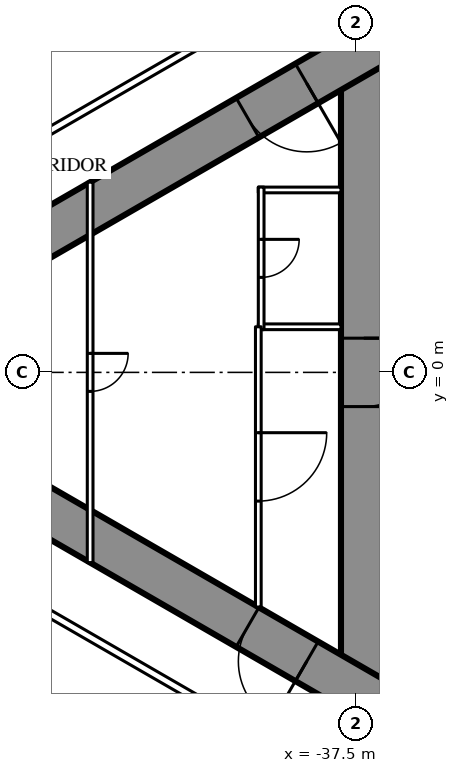
"""IFC4 building model, lengths in metres.
Left out: names, types, materials, properties, quantities, classifications, styles, units other than length and angle.
Written with IfcOpenShell. Run it as: python <this file> out.ifc"""

import sys

from ifc_helpers import new_model, si_unit, direction, frame, frame_2d, origin, place, context, subcontext, project, spatial, rectangle, extrude, element, fill, save


model = new_model("IFC4")
c1 = context("Model", 3, precision=1e-05, world=origin(), true_north=direction((0.0, 1.0)))
c2 = subcontext(c1, "Body", "Model", "MODEL_VIEW")
j1 = project(units=[si_unit("LENGTHUNIT", "METRE"), si_unit("PLANEANGLEUNIT", "RADIAN")], contexts=[c1])
p1 = place(None, origin())
s1 = spatial("IfcSite", under=j1, at=p1, CompositionType="ELEMENT")
p2 = place(p1, origin())
s2 = spatial("IfcBuilding", under=s1, at=p2, CompositionType="ELEMENT")
p3 = place(p2, frame((0.0, 0.0, 42.5)))
s3 = spatial("IfcBuildingStorey", under=s2, at=p3, CompositionType="ELEMENT", Elevation=42.5)
p4 = place(p3, frame((-37.3, 8.6, 0.0), z_axis=(0.0, 0.0, 1.0), x_axis=(0.0, -1.0, 0.0)))
e1 = element("IfcWall", 1, at=p4, inside=s3, PredefinedType="SHEAR", context=c2, shape_type="SweptSolid", body=[
    extrude(rectangle(XDim=17.2, YDim=1.2, at=frame_2d((8.6, 0.0))), origin(), (0.0, 0.0, 1.0), 3.5),
])
p5 = place(p4, frame((7.7, 0.0, 0.0)))
e2 = element("IfcOpeningElement", 2, at=p5, cuts=e1, PredefinedType="OPENING", context=c2, shape_type="SweptSolid", body=[
    extrude(rectangle(XDim=1.8, YDim=2.2, at=frame_2d((0.9, 1.1))), frame((0.0, 0.61, 0.0), z_axis=(0.0, -1.0, 0.0), x_axis=(1.0, 0.0, 0.0)), (0.0, 0.0, 1.0), 1.22),
])
p6 = place(p3, frame((-27.2, 14.3, 0.0), z_axis=(0.0, 0.0, 1.0), x_axis=(-0.866026593062, -0.499997940104, 0.0)))
e3 = element("IfcWall", 3, at=p6, inside=s3, PredefinedType="SHEAR", context=c2, shape_type="SweptSolid", body=[
    extrude(rectangle(XDim=28.946, YDim=1.2, at=frame_2d((14.473, 0.0))), origin(), (0.0, 0.0, 1.0), 3.5),
])
p7 = place(p6, frame((4.6, 0.0, 0.0)))
e4 = element("IfcOpeningElement", 4, at=p7, cuts=e3, PredefinedType="OPENING", context=c2, shape_type="SweptSolid", body=[
    extrude(rectangle(XDim=1.0, YDim=2.2, at=frame_2d((0.5, 1.1))), frame((0.0, 0.61, 0.0), z_axis=(0.0, -1.0, 0.0), x_axis=(1.0, 0.0, 0.0)), (0.0, 0.0, 1.0), 1.22),
])
p8 = place(p6, frame((13.395, 0.0, 0.0)))
e5 = element("IfcOpeningElement", 5, at=p8, cuts=e3, PredefinedType="OPENING", context=c2, shape_type="SweptSolid", body=[
    extrude(rectangle(XDim=1.8, YDim=2.2, at=frame_2d((0.9, 1.1))), frame((0.0, 0.61, 0.0), z_axis=(0.0, -1.0, 0.0), x_axis=(1.0, 0.0, 0.0)), (0.0, 0.0, 1.0), 1.22),
])
p9 = place(p3, frame((-27.2, -14.3, 0.0), z_axis=(0.0, 0.0, 1.0), x_axis=(-0.866024021859, 0.500002393557, 0.0)))
e6 = element("IfcWall", 6, at=p9, inside=s3, PredefinedType="SHEAR", context=c2, shape_type="SweptSolid", body=[
    extrude(rectangle(XDim=27.907, YDim=1.2, at=frame_2d((13.954, 0.0))), origin(), (0.0, 0.0, 1.0), 3.5),
])
p10 = place(p9, frame((4.6, 0.0, 0.0)))
e7 = element("IfcOpeningElement", 7, at=p10, cuts=e6, PredefinedType="OPENING", context=c2, shape_type="SweptSolid", body=[
    extrude(rectangle(XDim=1.0, YDim=2.2, at=frame_2d((0.5, 1.1))), frame((0.0, 0.61, 0.0), z_axis=(0.0, -1.0, 0.0), x_axis=(1.0, 0.0, 0.0)), (0.0, 0.0, 1.0), 1.22),
])
p11 = place(p9, frame((13.395, 0.0, 0.0)))
e8 = element("IfcOpeningElement", 8, at=p11, cuts=e6, PredefinedType="OPENING", context=c2, shape_type="SweptSolid", body=[
    extrude(rectangle(XDim=1.8, YDim=2.2, at=frame_2d((0.9, 1.1))), frame((0.0, 0.61, 0.0), z_axis=(0.0, -1.0, 0.0), x_axis=(1.0, 0.0, 0.0)), (0.0, 0.0, 1.0), 1.22),
])
p12 = place(p3, frame((-37.7, 10.894, 0.0), z_axis=(0.0, 0.0, 1.0), x_axis=(-0.866027905338, -0.499995667157, 0.0)))
e9 = element("IfcWall", 9, at=p12, inside=s3, PredefinedType="PARTITIONING", context=c2, shape_type="SweptSolid", body=[
    extrude(rectangle(XDim=21.787, YDim=0.2, at=frame_2d((10.894, 0.0))), origin(), (0.0, 0.0, 1.0), 3.25),
])
p13 = place(p12, frame((11.78, 0.0, 0.0)))
e10 = element("IfcOpeningElement", 10, at=p13, cuts=e9, PredefinedType="OPENING", context=c2, shape_type="SweptSolid", body=[
    extrude(rectangle(XDim=0.95, YDim=2.2, at=frame_2d((0.475, 1.1))), frame((0.0, 0.11, 0.0), z_axis=(0.0, -1.0, 0.0), x_axis=(1.0, 0.0, 0.0)), (0.0, 0.0, 1.0), 0.22),
])
p14 = place(p12, frame((2.95, 0.0, 0.0)))
e11 = element("IfcOpeningElement", 11, at=p14, cuts=e9, PredefinedType="OPENING", context=c2, shape_type="SweptSolid", body=[
    extrude(rectangle(XDim=0.95, YDim=2.2, at=frame_2d((0.475, 1.1))), frame((0.0, 0.11, 0.0), z_axis=(0.0, -1.0, 0.0), x_axis=(1.0, 0.0, 0.0)), (0.0, 0.0, 1.0), 0.22),
])
p15 = place(p3, frame((-36.92, -11.344, 0.0), z_axis=(0.0, 0.0, 1.0), x_axis=(-0.866028313256, 0.499994960614, 0.0)))
e12 = element("IfcWall", 12, at=p15, inside=s3, PredefinedType="PARTITIONING", context=c2, shape_type="SweptSolid", body=[
    extrude(rectangle(XDim=22.568, YDim=0.2, at=frame_2d((11.284, 0.0))), origin(), (0.0, 0.0, 1.0), 3.25),
])
p16 = place(p15, frame((21.018, 0.0, 0.0)))
e13 = element("IfcOpeningElement", 13, at=p16, cuts=e12, PredefinedType="OPENING", context=c2, shape_type="SweptSolid", body=[
    extrude(rectangle(XDim=0.95, YDim=2.2, at=frame_2d((0.475, 1.1))), frame((0.0, 0.11, 0.0), z_axis=(0.0, -1.0, 0.0), x_axis=(1.0, 0.0, 0.0)), (0.0, 0.0, 1.0), 0.22),
])
p17 = place(p15, frame((3.35, 0.0, 0.0)))
e14 = element("IfcOpeningElement", 14, at=p17, cuts=e12, PredefinedType="OPENING", context=c2, shape_type="SweptSolid", body=[
    extrude(rectangle(XDim=1.0, YDim=2.2, at=frame_2d((0.5, 1.1))), frame((0.0, 0.11, 0.0), z_axis=(0.0, -1.0, 0.0), x_axis=(1.0, 0.0, 0.0)), (0.0, 0.0, 1.0), 0.22),
])
for number, where, z_axis, x_axis in (
    (15, (-37.9, 1.2, 0.0), (0.0, 0.0, 1.0), (-1.0, 0.0, 0.0)),
    (16, (-37.9, 4.8, 0.0), (0.0, 0.0, 1.0), (-1.0, 0.0, 0.0)),
):
    element("IfcWall", number, at=place(p3, frame(where, z_axis=z_axis, x_axis=x_axis)), inside=s3, PredefinedType="PARTITIONING", context=c2, shape_type="SweptSolid", body=[
        extrude(rectangle(XDim=2.175, YDim=0.15, at=frame_2d((1.087, 0.0))), origin(), (0.0, 0.0, 1.0), 3.25),
    ])
p18 = place(p3, frame((-40.0, 4.875, 0.0), z_axis=(0.0, 0.0, 1.0), x_axis=(0.0, -1.0, 0.0)))
e17 = element("IfcWall", 17, at=p18, inside=s3, PredefinedType="PARTITIONING", context=c2, shape_type="SweptSolid", body=[
    extrude(rectangle(XDim=3.75, YDim=0.15, at=frame_2d((1.875, 0.0))), origin(), (0.0, 0.0, 1.0), 3.25),
])
p19 = place(p18, frame((1.375, 0.0, 0.0)))
e18 = element("IfcOpeningElement", 18, at=p19, cuts=e17, PredefinedType="OPENING", context=c2, shape_type="SweptSolid", body=[
    extrude(rectangle(XDim=1.0, YDim=2.2, at=frame_2d((0.5, 1.1))), frame((0.0, 0.085, 0.0), z_axis=(0.0, -1.0, 0.0), x_axis=(1.0, 0.0, 0.0)), (0.0, 0.0, 1.0), 0.17),
])
p20 = place(p3, frame((-40.075, 1.2, 0.0), z_axis=(0.0, 0.0, 1.0), x_axis=(0.0, -1.0, 0.0)))
e19 = element("IfcWall", 19, at=p20, inside=s3, PredefinedType="PARTITIONING", context=c2, shape_type="SweptSolid", body=[
    extrude(rectangle(XDim=7.374, YDim=0.15, at=frame_2d((3.687, 0.0))), origin(), (0.0, 0.0, 1.0), 3.25),
])
p21 = place(p20, frame((2.787, 0.0, 0.0)))
e20 = element("IfcOpeningElement", 20, at=p21, cuts=e19, PredefinedType="OPENING", context=c2, shape_type="SweptSolid", body=[
    extrude(rectangle(XDim=1.8, YDim=2.2, at=frame_2d((0.9, 1.1))), frame((0.0, 0.085, 0.0), z_axis=(0.0, -1.0, 0.0), x_axis=(1.0, 0.0, 0.0)), (0.0, 0.0, 1.0), 0.17),
])
p22 = place(p3, frame((-44.5, 5.005, 0.0), z_axis=(0.0, 0.0, 1.0), x_axis=(0.0, -1.0, 0.0)))
e21 = element("IfcWall", 21, at=p22, inside=s3, PredefinedType="PARTITIONING", context=c2, shape_type="SweptSolid", body=[
    extrude(rectangle(XDim=10.009, YDim=0.15, at=frame_2d((5.005, 0.0))), origin(), (0.0, 0.0, 1.0), 2.45),
])
p23 = place(p22, frame((4.505, 0.0, 0.0)))
e22 = element("IfcOpeningElement", 22, at=p23, cuts=e21, PredefinedType="OPENING", context=c2, shape_type="SweptSolid", body=[
    extrude(rectangle(XDim=1.0, YDim=2.2, at=frame_2d((0.5, 1.1))), frame((0.0, 0.085, 0.0), z_axis=(0.0, -1.0, 0.0), x_axis=(1.0, 0.0, 0.0)), (0.0, 0.0, 1.0), 0.17),
])
p24 = place(p19, origin())
e23 = element("IfcDoor", 23, at=p24, inside=s3, OperationType="SINGLE_SWING_LEFT", PredefinedType="DOOR", context=c2, shape_type="SweptSolid", body=[
    extrude(rectangle(XDim=1.0, YDim=2.2, at=frame_2d((0.5, 1.1))), frame((0.0, 0.025, 0.0), z_axis=(0.0, -1.0, 0.0), x_axis=(1.0, 0.0, 0.0)), (0.0, 0.0, 1.0), 0.05),
])
fill(e18, e23)
p25 = place(p21, origin())
e24 = element("IfcDoor", 24, at=p25, inside=s3, OperationType="DOUBLE_DOOR_SINGLE_SWING", PredefinedType="DOOR", context=c2, shape_type="SweptSolid", body=[
    extrude(rectangle(XDim=1.8, YDim=2.2, at=frame_2d((0.9, 1.1))), frame((0.0, 0.025, 0.0), z_axis=(0.0, -1.0, 0.0), x_axis=(1.0, 0.0, 0.0)), (0.0, 0.0, 1.0), 0.05),
])
fill(e20, e24)
p26 = place(p23, origin())
e25 = element("IfcDoor", 25, at=p26, inside=s3, OperationType="SINGLE_SWING_LEFT", PredefinedType="DOOR", context=c2, shape_type="SweptSolid", body=[
    extrude(rectangle(XDim=1.0, YDim=2.2, at=frame_2d((0.5, 1.1))), frame((0.0, 0.025, 0.0), z_axis=(0.0, -1.0, 0.0), x_axis=(1.0, 0.0, 0.0)), (0.0, 0.0, 1.0), 0.05),
])
fill(e22, e25)
p27 = place(p8, origin())
e26 = element("IfcDoor", 26, at=p27, inside=s3, OperationType="DOUBLE_DOOR_SINGLE_SWING", PredefinedType="DOOR", context=c2, shape_type="SweptSolid", body=[
    extrude(rectangle(XDim=1.8, YDim=2.2, at=frame_2d((0.9, 1.1))), frame((0.0, 0.025, 0.0), z_axis=(0.0, -1.0, 0.0), x_axis=(1.0, 0.0, 0.0)), (0.0, 0.0, 1.0), 0.05),
])
fill(e5, e26)
p28 = place(p11, origin())
e27 = element("IfcDoor", 27, at=p28, inside=s3, OperationType="DOUBLE_DOOR_SINGLE_SWING", PredefinedType="DOOR", context=c2, shape_type="SweptSolid", body=[
    extrude(rectangle(XDim=1.8, YDim=2.2, at=frame_2d((0.9, 1.1))), frame((0.0, 0.025, 0.0), z_axis=(0.0, -1.0, 0.0), x_axis=(1.0, 0.0, 0.0)), (0.0, 0.0, 1.0), 0.05),
])
fill(e8, e27)
p29 = place(p5, origin())
e28 = element("IfcDoor", 28, at=p29, inside=s3, OperationType="DOUBLE_DOOR_SINGLE_SWING", PredefinedType="DOOR", context=c2, shape_type="SweptSolid", body=[
    extrude(rectangle(XDim=1.8, YDim=2.2, at=frame_2d((0.9, 1.1))), frame((0.0, 0.025, 0.0), z_axis=(0.0, -1.0, 0.0), x_axis=(1.0, 0.0, 0.0)), (0.0, 0.0, 1.0), 0.05),
])
fill(e2, e28)
save(model, sys.argv[1])
